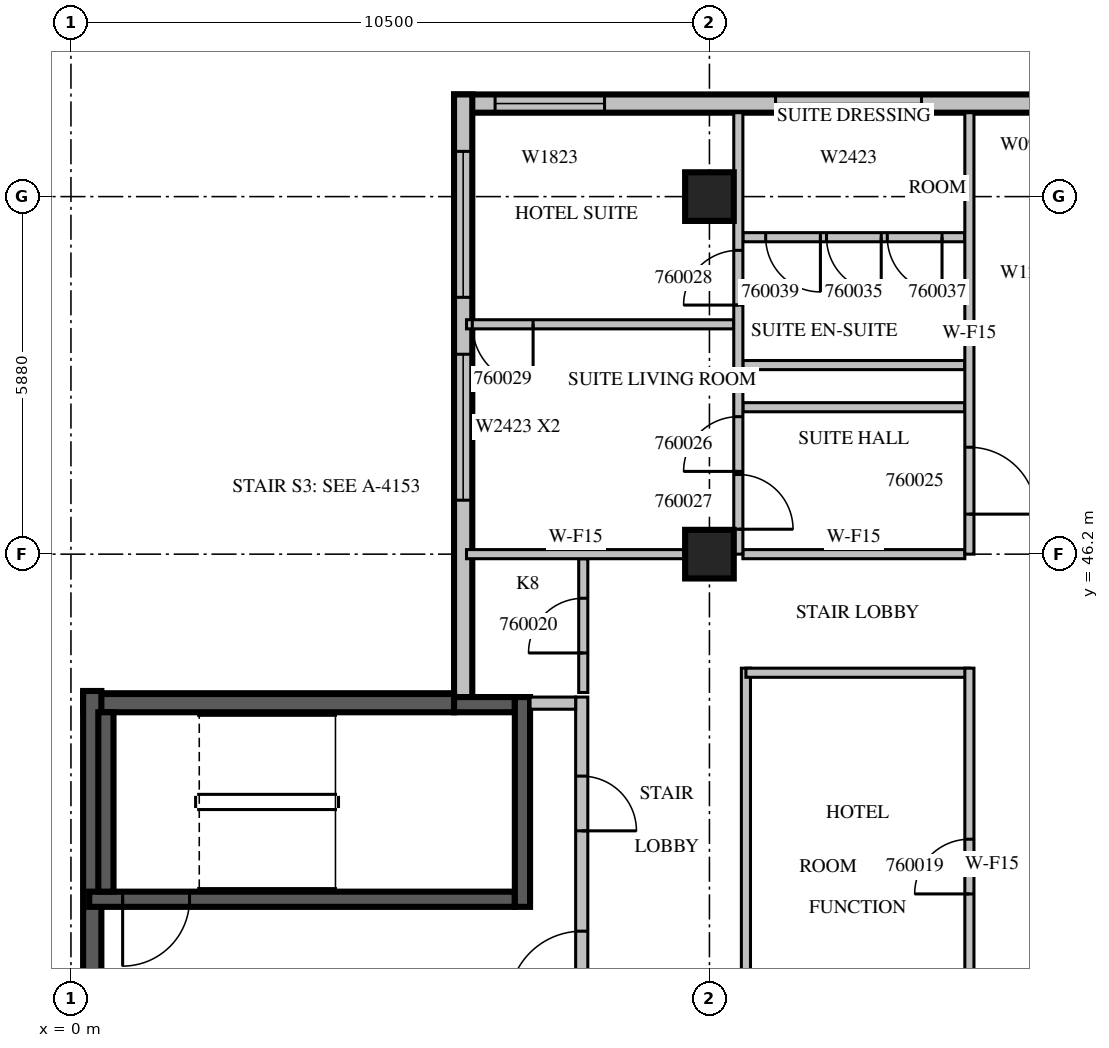
"""IFC4 building model, lengths in metres.
Left out: names, types, materials, properties, quantities, classifications, styles, units other than length and angle.
Written with IfcOpenShell. Run it as: python <this file> out.ifc"""

import sys

from ifc_helpers import new_model, si_unit, direction, frame, frame_2d, origin, origin_2d, place, context, subcontext, project, spatial, rectangle, extrude, source, transform, mapped, element, fill, save


model = new_model("IFC4")
c1 = context("Model", 3, precision=1e-05, world=origin(), true_north=direction((0.0, 1.0)))
c2 = subcontext(c1, "Body", "Model", "MODEL_VIEW")
j1 = project(units=[si_unit("LENGTHUNIT", "METRE"), si_unit("PLANEANGLEUNIT", "RADIAN")], contexts=[c1])
p1 = place(None, origin())
s1 = spatial("IfcSite", under=j1, at=p1, CompositionType="ELEMENT")
p2 = place(p1, origin())
s2 = spatial("IfcBuilding", under=s1, at=p2, CompositionType="ELEMENT")
p3 = place(p2, frame((0.0, 0.0, 261.4)))
s3 = spatial("IfcBuildingStorey", under=s2, at=p3, CompositionType="ELEMENT", Elevation=261.4)
m1 = source(origin(), c2, "Body", "SweptSolid", [
    extrude(rectangle(XDim=0.8, YDim=0.8, at=origin_2d()), origin(), (0.0, 0.0, 1.0), 3.8),
])
for number, where, z_axis, x_axis in (
    (1, (10.5, 46.2, 0.0), (0.0, 0.0, 1.0), (1.0, 0.0, 0.0)),
    (2, (10.5, 52.08, 0.0), (0.0, 0.0, 1.0), (1.0, 0.0, 0.0)),
):
    element("IfcColumn", number, at=place(p3, frame(where, z_axis=z_axis, x_axis=x_axis)), inside=s3, PredefinedType="COLUMN", context=c2, shape_type="MappedRepresentation", body=[
        mapped(m1, transform((0.0, 0.0, 0.0), scale=1.0)),
    ])
m2 = source(origin(), c2, "Body", "SweptSolid", [
    extrude(rectangle(XDim=10.5, YDim=0.3, at=frame_2d((5.25, 0.0))), origin(), (0.0, 0.0, 1.0), 3.4),
])
p4 = place(p3, frame((16.8, 53.61, 0.0), z_axis=(0.0, 0.0, 1.0), x_axis=(-1.0, 0.0, 0.0)))
e3 = element("IfcWall", 3, at=p4, inside=s3, PredefinedType="STANDARD", context=c2, shape_type="MappedRepresentation", body=[
    mapped(m2, transform((0.0, 0.0, 0.0), scale=1.0)),
])
m3 = source(origin(), c2, "Body", "SweptSolid", [
    extrude(rectangle(XDim=1.8, YDim=2.3, at=frame_2d((0.9, 1.15))), frame((0.0, 0.16, 0.0), z_axis=(0.0, -1.0, 0.0), x_axis=(1.0, 0.0, 0.0)), (0.0, 0.0, 1.0), 0.32),
])
p5 = place(p4, frame((8.025, 0.0, 0.6)))
e4 = element("IfcOpeningElement", 4, at=p5, cuts=e3, PredefinedType="OPENING", context=c2, shape_type="MappedRepresentation", body=[
    mapped(m3, transform((0.0, 0.0, 0.0), scale=1.0)),
])
m4 = source(origin(), c2, "Body", "SweptSolid", [
    extrude(rectangle(XDim=2.4, YDim=2.3, at=frame_2d((1.2, 1.15))), frame((0.0, 0.16, 0.0), z_axis=(0.0, -1.0, 0.0), x_axis=(1.0, 0.0, 0.0)), (0.0, 0.0, 1.0), 0.32),
])
p6 = place(p4, frame((2.812, 0.0, 0.6)))
e5 = element("IfcOpeningElement", 5, at=p6, cuts=e3, PredefinedType="OPENING", context=c2, shape_type="MappedRepresentation", body=[
    mapped(m4, transform((0.0, 0.0, 0.0), scale=1.0)),
])
m5 = source(origin(), c2, "Body", "SweptSolid", [
    extrude(rectangle(XDim=9.91, YDim=0.3, at=frame_2d((4.955, 0.0))), origin(), (0.0, 0.0, 1.0), 3.4),
])
p7 = place(p3, frame((6.45, 53.76, 0.0), z_axis=(0.0, 0.0, 1.0), x_axis=(0.0, -1.0, 0.0)))
e6 = element("IfcWall", 6, at=p7, inside=s3, PredefinedType="STANDARD", context=c2, shape_type="MappedRepresentation", body=[
    mapped(m5, transform((0.0, 0.0, 0.0), scale=1.0)),
])
p8 = place(p7, frame((4.272, 0.0, 0.6)))
e7 = element("IfcOpeningElement", 7, at=p8, cuts=e6, PredefinedType="OPENING", context=c2, shape_type="MappedRepresentation", body=[
    mapped(m4, transform((0.0, 0.0, 0.0), scale=1.0)),
])
p9 = place(p7, frame((0.936, 0.0, 0.6)))
e8 = element("IfcOpeningElement", 8, at=p9, cuts=e6, PredefinedType="OPENING", context=c2, shape_type="MappedRepresentation", body=[
    mapped(m4, transform((0.0, 0.0, 0.0), scale=1.0)),
])
m6 = source(origin(), c2, "Body", "SweptSolid", [
    extrude(rectangle(XDim=6.1, YDim=0.3, at=frame_2d((3.05, 0.0))), origin(), (0.0, 0.0, 1.0), 3.4),
])
p10 = place(p3, frame((6.3, 43.75, 0.0), z_axis=(0.0, 0.0, 1.0), x_axis=(-1.0, 0.0, 0.0)))
e9 = element("IfcWall", 9, at=p10, inside=s3, PredefinedType="SOLIDWALL", context=c2, shape_type="MappedRepresentation", body=[
    mapped(m6, transform((0.0, 0.0, 0.0), scale=1.0)),
])
m7 = source(origin(), c2, "Body", "SweptSolid", [
    extrude(rectangle(XDim=5.65, YDim=0.3, at=frame_2d((2.825, 0.0))), origin(), (0.0, 0.0, 1.0), 3.4),
])
p11 = place(p3, frame((0.35, 43.95, 0.0), z_axis=(0.0, 0.0, 1.0), x_axis=(0.0, -1.0, 0.0)))
e10 = element("IfcWall", 10, at=p11, inside=s3, PredefinedType="SOLIDWALL", context=c2, shape_type="MappedRepresentation", body=[
    mapped(m7, transform((0.0, 0.0, 0.0), scale=1.0)),
])
m8 = source(origin(), c2, "Body", "SweptSolid", [
    extrude(rectangle(XDim=7.0, YDim=0.25, at=frame_2d((3.5, 0.0))), origin(), (0.0, 0.0, 1.0), 3.4),
])
p12 = place(p3, frame((0.3, 40.525, 0.0), z_axis=(0.0, 0.0, 1.0), x_axis=(1.0, 0.0, 0.0)))
e11 = element("IfcWall", 11, at=p12, inside=s3, PredefinedType="SOLIDWALL", context=c2, shape_type="MappedRepresentation", body=[
    mapped(m8, transform((0.0, 0.0, 0.0), scale=1.0)),
])
m9 = source(origin(), c2, "Body", "SweptSolid", [
    extrude(rectangle(XDim=1.1, YDim=2.1, at=frame_2d((0.55, 1.05))), frame((0.0, 0.135, 0.0), z_axis=(0.0, -1.0, 0.0), x_axis=(1.0, 0.0, 0.0)), (0.0, 0.0, 1.0), 0.27),
])
p13 = place(p12, frame((0.55, 0.0, 0.0)))
e12 = element("IfcOpeningElement", 12, at=p13, cuts=e11, PredefinedType="OPENING", context=c2, shape_type="MappedRepresentation", body=[
    mapped(m9, transform((0.0, 0.0, 0.0), scale=1.0)),
])
m10 = source(origin(), c2, "Body", "SweptSolid", [
    extrude(rectangle(XDim=1.0, YDim=0.25, at=frame_2d((0.5, 0.0))), origin(), (0.0, 0.0, 1.0), 3.4),
])
p14 = place(p3, frame((6.3, 43.725, 0.0), z_axis=(0.0, 0.0, 1.0), x_axis=(1.0, 0.0, 0.0)))
e13 = element("IfcWall", 13, at=p14, inside=s3, PredefinedType="SOLIDWALL", context=c2, shape_type="MappedRepresentation", body=[
    mapped(m10, transform((0.0, 0.0, 0.0), scale=1.0)),
])
m11 = source(origin(), c2, "Body", "SweptSolid", [
    extrude(rectangle(XDim=3.45, YDim=0.25, at=frame_2d((1.725, 0.0))), origin(), (0.0, 0.0, 1.0), 3.4),
])
p15 = place(p3, frame((7.425, 40.4, 0.0), z_axis=(0.0, 0.0, 1.0), x_axis=(0.0, 1.0, 0.0)))
e14 = element("IfcWall", 14, at=p15, inside=s3, PredefinedType="SOLIDWALL", context=c2, shape_type="MappedRepresentation", body=[
    mapped(m11, transform((0.0, 0.0, 0.0), scale=1.0)),
])
m12 = source(origin(), c2, "Body", "SweptSolid", [
    extrude(rectangle(XDim=2.95, YDim=0.25, at=frame_2d((1.475, 0.0))), origin(), (0.0, 0.0, 1.0), 3.4),
])
p16 = place(p3, frame((0.575, 40.65, 0.0), z_axis=(0.0, 0.0, 1.0), x_axis=(0.0, 1.0, 0.0)))
e15 = element("IfcWall", 15, at=p16, inside=s3, PredefinedType="SOLIDWALL", context=c2, shape_type="MappedRepresentation", body=[
    mapped(m12, transform((0.0, 0.0, 0.0), scale=1.0)),
])
m13 = source(origin(), c2, "Body", "SweptSolid", [
    extrude(rectangle(XDim=5.45, YDim=0.2, at=frame_2d((2.725, 0.0))), origin(), (0.0, 0.0, 1.0), 3.4),
])
p17 = place(p3, frame((8.4, 38.4, 0.0), z_axis=(0.0, 0.0, 1.0), x_axis=(0.0, 1.0, 0.0)))
e16 = element("IfcWall", 16, at=p17, inside=s3, PredefinedType="PARTITIONING", context=c2, shape_type="MappedRepresentation", body=[
    mapped(m13, transform((0.0, 0.0, 0.0), scale=1.0)),
])
m14 = source(origin(), c2, "Body", "SweptSolid", [
    extrude(rectangle(XDim=1.2, YDim=2.1, at=frame_2d((0.6, 1.05))), frame((0.0, 0.11, 0.0), z_axis=(0.0, -1.0, 0.0), x_axis=(1.0, 0.0, 0.0)), (0.0, 0.0, 1.0), 0.22),
])
p18 = place(p17, frame((0.4, 0.0, 0.0)))
e17 = element("IfcOpeningElement", 17, at=p18, cuts=e16, PredefinedType="OPENING", context=c2, shape_type="MappedRepresentation", body=[
    mapped(m14, transform((0.0, 0.0, 0.0), scale=1.0)),
])
m15 = source(origin(), c2, "Body", "SweptSolid", [
    extrude(rectangle(XDim=0.9, YDim=2.1, at=frame_2d((0.45, 1.05))), frame((0.0, 0.11, 0.0), z_axis=(0.0, -1.0, 0.0), x_axis=(1.0, 0.0, 0.0)), (0.0, 0.0, 1.0), 0.22),
])
p19 = place(p17, frame((3.25, 0.0, 0.0)))
e18 = element("IfcOpeningElement", 18, at=p19, cuts=e16, PredefinedType="OPENING", context=c2, shape_type="MappedRepresentation", body=[
    mapped(m15, transform((0.0, 0.0, 0.0), scale=1.0)),
])
m16 = source(origin(), c2, "Body", "SweptSolid", [
    extrude(rectangle(XDim=0.75, YDim=0.2, at=frame_2d((0.375, 0.0))), origin(), (0.0, 0.0, 1.0), 3.4),
])
p20 = place(p3, frame((7.55, 43.75, 0.0), z_axis=(0.0, 0.0, 1.0), x_axis=(1.0, 0.0, 0.0)))
e19 = element("IfcWall", 19, at=p20, inside=s3, PredefinedType="PARTITIONING", context=c2, shape_type="MappedRepresentation", body=[
    mapped(m16, transform((0.0, 0.0, 0.0), scale=1.0)),
])
m17 = source(origin(), c2, "Body", "SweptSolid", [
    extrude(rectangle(XDim=6.45, YDim=0.15, at=frame_2d((3.225, 0.0))), origin(), (0.0, 0.0, 1.0), 3.4),
])
p21 = place(p3, frame((11.1, 44.325, 0.0), z_axis=(0.0, 0.0, 1.0), x_axis=(0.0, -1.0, 0.0)))
e20 = element("IfcWall", 20, at=p21, inside=s3, PredefinedType="PARTITIONING", context=c2, shape_type="MappedRepresentation", body=[
    mapped(m17, transform((0.0, 0.0, 0.0), scale=1.0)),
])
m18 = source(origin(), c2, "Body", "SweptSolid", [
    extrude(rectangle(XDim=3.675, YDim=0.15, at=frame_2d((1.837, 0.0))), origin(), (0.0, 0.0, 1.0), 3.4),
])
p22 = place(p3, frame((14.775, 44.25, 0.0), z_axis=(0.0, 0.0, 1.0), x_axis=(-1.0, 0.0, 0.0)))
e21 = element("IfcWall", 21, at=p22, inside=s3, PredefinedType="PARTITIONING", context=c2, shape_type="MappedRepresentation", body=[
    mapped(m18, transform((0.0, 0.0, 0.0), scale=1.0)),
])
p23 = place(p3, frame((14.775, 37.875, 0.0), z_axis=(0.0, 0.0, 1.0), x_axis=(0.0, 1.0, 0.0)))
e22 = element("IfcWall", 22, at=p23, inside=s3, PredefinedType="PARTITIONING", context=c2, shape_type="MappedRepresentation", body=[
    mapped(m17, transform((0.0, 0.0, 0.0), scale=1.0)),
])
m19 = source(origin(), c2, "Body", "SweptSolid", [
    extrude(rectangle(XDim=0.9, YDim=2.1, at=frame_2d((0.45, 1.05))), frame((0.0, 0.085, 0.0), z_axis=(0.0, -1.0, 0.0), x_axis=(1.0, 0.0, 0.0)), (0.0, 0.0, 1.0), 0.17),
])
p24 = place(p23, frame((2.737, 0.0, 0.0)))
e23 = element("IfcOpeningElement", 23, at=p24, cuts=e22, PredefinedType="OPENING", context=c2, shape_type="MappedRepresentation", body=[
    mapped(m19, transform((0.0, 0.0, 0.0), scale=1.0)),
])
m20 = source(origin(), c2, "Body", "SweptSolid", [
    extrude(rectangle(XDim=2.2, YDim=0.15, at=frame_2d((1.1, 0.0))), origin(), (0.0, 0.0, 1.0), 3.4),
])
p25 = place(p3, frame((8.425, 43.925, 0.0), z_axis=(0.0, 0.0, 1.0), x_axis=(0.0, 1.0, 0.0)))
e24 = element("IfcWall", 24, at=p25, inside=s3, PredefinedType="PARTITIONING", context=c2, shape_type="MappedRepresentation", body=[
    mapped(m20, transform((0.0, 0.0, 0.0), scale=1.0)),
])
p26 = place(p25, frame((0.65, 0.0, 0.0)))
e25 = element("IfcOpeningElement", 25, at=p26, cuts=e24, PredefinedType="OPENING", context=c2, shape_type="MappedRepresentation", body=[
    mapped(m19, transform((0.0, 0.0, 0.0), scale=1.0)),
])
p27 = place(p3, frame((10.9, 49.98, 0.0), z_axis=(0.0, 0.0, 1.0), x_axis=(-1.0, 0.0, 0.0)))
e26 = element("IfcWall", 26, at=p27, inside=s3, PredefinedType="PARTITIONING", context=c2, shape_type="SweptSolid", body=[
    extrude(rectangle(XDim=4.395, YDim=0.15, at=frame_2d((2.197, 0.0))), origin(), (0.0, 0.0, 1.0), 3.4),
])
m21 = source(origin(), c2, "Body", "SweptSolid", [
    extrude(rectangle(XDim=1.0, YDim=2.1, at=frame_2d((0.5, 1.05))), frame((0.0, 0.085, 0.0), z_axis=(0.0, -1.0, 0.0), x_axis=(1.0, 0.0, 0.0)), (0.0, 0.0, 1.0), 0.17),
])
p28 = place(p27, frame((3.3, 0.0, 0.0)))
e27 = element("IfcOpeningElement", 27, at=p28, cuts=e26, PredefinedType="OPENING", context=c2, shape_type="MappedRepresentation", body=[
    mapped(m21, transform((0.0, 0.0, 0.0), scale=1.0)),
])
m22 = source(origin(), c2, "Body", "SweptSolid", [
    extrude(rectangle(XDim=3.65, YDim=0.15, at=frame_2d((1.825, 0.0))), origin(), (0.0, 0.0, 1.0), 3.4),
])
for number, where, z_axis, x_axis in (
    (28, (14.7, 48.617, 0.0), (0.0, 0.0, 1.0), (-1.0, 0.0, 0.0)),
    (29, (14.7, 49.309, 0.0), (0.0, 0.0, 1.0), (-1.0, 0.0, 0.0)),
):
    element("IfcWall", number, at=place(p3, frame(where, z_axis=z_axis, x_axis=x_axis)), inside=s3, PredefinedType="PARTITIONING", context=c2, shape_type="MappedRepresentation", body=[
        mapped(m22, transform((0.0, 0.0, 0.0), scale=1.0)),
    ])
p29 = place(p3, frame((14.7, 51.412, 0.0), z_axis=(0.0, 0.0, 1.0), x_axis=(-1.0, 0.0, 0.0)))
e30 = element("IfcWall", 30, at=p29, inside=s3, PredefinedType="PARTITIONING", context=c2, shape_type="MappedRepresentation", body=[
    mapped(m22, transform((0.0, 0.0, 0.0), scale=1.0)),
])
p30 = place(p29, frame((1.375, 0.0, 0.0)))
e31 = element("IfcOpeningElement", 31, at=p30, cuts=e30, PredefinedType="OPENING", context=c2, shape_type="MappedRepresentation", body=[
    mapped(m19, transform((0.0, 0.0, 0.0), scale=1.0)),
])
p31 = place(p29, frame((0.375, 0.0, 0.0)))
e32 = element("IfcOpeningElement", 32, at=p31, cuts=e30, PredefinedType="OPENING", context=c2, shape_type="MappedRepresentation", body=[
    mapped(m19, transform((0.0, 0.0, 0.0), scale=1.0)),
])
p32 = place(p29, frame((2.375, 0.0, 0.0)))
e33 = element("IfcOpeningElement", 33, at=p32, cuts=e30, PredefinedType="OPENING", context=c2, shape_type="MappedRepresentation", body=[
    mapped(m19, transform((0.0, 0.0, 0.0), scale=1.0)),
])
m23 = source(origin(), c2, "Body", "SweptSolid", [
    extrude(rectangle(XDim=3.596, YDim=0.15, at=frame_2d((1.798, 0.0))), origin(), (0.0, 0.0, 1.0), 3.4),
])
p33 = place(p3, frame((10.101, 46.2, 0.0), z_axis=(0.0, 0.0, 1.0), x_axis=(-1.0, 0.0, 0.0)))
e34 = element("IfcWall", 34, at=p33, inside=s3, PredefinedType="PARTITIONING", context=c2, shape_type="MappedRepresentation", body=[
    mapped(m23, transform((0.0, 0.0, 0.0), scale=1.0)),
])
p34 = place(p3, frame((14.7, 46.2, 0.0), z_axis=(0.0, 0.0, 1.0), x_axis=(-1.0, 0.0, 0.0)))
e35 = element("IfcWall", 35, at=p34, inside=s3, PredefinedType="PARTITIONING", context=c2, shape_type="MappedRepresentation", body=[
    mapped(m22, transform((0.0, 0.0, 0.0), scale=1.0)),
])
m24 = source(origin(), c2, "Body", "SweptSolid", [
    extrude(rectangle(XDim=7.26, YDim=0.15, at=frame_2d((3.63, 0.0))), origin(), (0.0, 0.0, 1.0), 3.4),
])
p35 = place(p3, frame((10.975, 46.2, 0.0), z_axis=(0.0, 0.0, 1.0), x_axis=(0.0, 1.0, 0.0)))
e36 = element("IfcWall", 36, at=p35, inside=s3, PredefinedType="PARTITIONING", context=c2, shape_type="MappedRepresentation", body=[
    mapped(m24, transform((0.0, 0.0, 0.0), scale=1.0)),
])
p36 = place(p35, frame((1.361, 0.0, 0.0)))
e37 = element("IfcOpeningElement", 37, at=p36, cuts=e36, PredefinedType="OPENING", context=c2, shape_type="MappedRepresentation", body=[
    mapped(m19, transform((0.0, 0.0, 0.0), scale=1.0)),
])
p37 = place(p35, frame((0.41, 0.0, 0.0)))
e38 = element("IfcOpeningElement", 38, at=p37, cuts=e36, PredefinedType="OPENING", context=c2, shape_type="MappedRepresentation", body=[
    mapped(m19, transform((0.0, 0.0, 0.0), scale=1.0)),
])
p38 = place(p35, frame((4.096, 0.0, 0.0)))
e39 = element("IfcOpeningElement", 39, at=p38, cuts=e36, PredefinedType="OPENING", context=c2, shape_type="MappedRepresentation", body=[
    mapped(m19, transform((0.0, 0.0, 0.0), scale=1.0)),
])
p39 = place(p3, frame((14.775, 46.2, 0.0), z_axis=(0.0, 0.0, 1.0), x_axis=(0.0, 1.0, 0.0)))
e40 = element("IfcWall", 40, at=p39, inside=s3, PredefinedType="PARTITIONING", context=c2, shape_type="MappedRepresentation", body=[
    mapped(m24, transform((0.0, 0.0, 0.0), scale=1.0)),
])
m25 = source(origin(), c2, "Body", "SweptSolid", [
    extrude(rectangle(XDim=1.1, YDim=2.1, at=frame_2d((0.55, 1.05))), frame((0.0, 0.085, 0.0), z_axis=(0.0, -1.0, 0.0), x_axis=(1.0, 0.0, 0.0)), (0.0, 0.0, 1.0), 0.17),
])
p40 = place(p39, frame((0.658, 0.0, 0.0)))
e41 = element("IfcOpeningElement", 41, at=p40, cuts=e40, PredefinedType="OPENING", context=c2, shape_type="MappedRepresentation", body=[
    mapped(m25, transform((0.0, 0.0, 0.0), scale=1.0)),
])
m26 = source(origin(), c2, "Body", "SweptSolid", [
    extrude(rectangle(XDim=1.8, YDim=2.3, at=frame_2d((0.9, 1.15))), frame((0.0, 0.03, 0.0), z_axis=(0.0, -1.0, 0.0), x_axis=(1.0, 0.0, 0.0)), (0.0, 0.0, 1.0), 0.06),
])
p41 = place(p5, origin())
e42 = element("IfcWindow", 42, at=p41, inside=s3, PartitioningType="SINGLE_PANEL", PredefinedType="WINDOW", context=c2, shape_type="MappedRepresentation", body=[
    mapped(m26, transform((0.0, 0.0, 0.0), scale=1.0)),
])
fill(e4, e42)
m27 = source(origin(), c2, "Body", "SweptSolid", [
    extrude(rectangle(XDim=2.4, YDim=2.3, at=frame_2d((1.2, 1.15))), frame((0.0, 0.03, 0.0), z_axis=(0.0, -1.0, 0.0), x_axis=(1.0, 0.0, 0.0)), (0.0, 0.0, 1.0), 0.06),
])
p42 = place(p6, origin())
e43 = element("IfcWindow", 43, at=p42, inside=s3, PartitioningType="SINGLE_PANEL", PredefinedType="WINDOW", context=c2, shape_type="MappedRepresentation", body=[
    mapped(m27, transform((0.0, 0.0, 0.0), scale=1.0)),
])
fill(e5, e43)
p43 = place(p8, origin())
e44 = element("IfcWindow", 44, at=p43, inside=s3, PartitioningType="SINGLE_PANEL", PredefinedType="WINDOW", context=c2, shape_type="MappedRepresentation", body=[
    mapped(m27, transform((0.0, 0.0, 0.0), scale=1.0)),
])
fill(e7, e44)
p44 = place(p9, origin())
e45 = element("IfcWindow", 45, at=p44, inside=s3, PartitioningType="SINGLE_PANEL", PredefinedType="WINDOW", context=c2, shape_type="MappedRepresentation", body=[
    mapped(m27, transform((0.0, 0.0, 0.0), scale=1.0)),
])
fill(e8, e45)
m28 = source(origin(), c2, "Body", "SweptSolid", [
    extrude(rectangle(XDim=1.1, YDim=2.1, at=frame_2d((0.55, 1.05))), frame((0.0, 0.025, 0.0), z_axis=(0.0, -1.0, 0.0), x_axis=(1.0, 0.0, 0.0)), (0.0, 0.0, 1.0), 0.05),
])
p45 = place(p13, origin())
e46 = element("IfcDoor", 46, at=p45, inside=s3, OperationType="SINGLE_SWING_RIGHT", PredefinedType="DOOR", context=c2, shape_type="MappedRepresentation", body=[
    mapped(m28, transform((0.0, 0.0, 0.0), scale=1.0)),
])
fill(e12, e46)
m29 = source(origin(), c2, "Body", "SweptSolid", [
    extrude(rectangle(XDim=1.2, YDim=2.1, at=frame_2d((0.6, 1.05))), frame((0.0, 0.025, 0.0), z_axis=(0.0, -1.0, 0.0), x_axis=(1.0, 0.0, 0.0)), (0.0, 0.0, 1.0), 0.05),
])
p46 = place(p18, origin())
e47 = element("IfcDoor", 47, at=p46, inside=s3, OperationType="SINGLE_SWING_LEFT", PredefinedType="DOOR", context=c2, shape_type="MappedRepresentation", body=[
    mapped(m29, transform((0.0, 0.0, 0.0), scale=1.0)),
])
fill(e17, e47)
m30 = source(origin(), c2, "Body", "SweptSolid", [
    extrude(rectangle(XDim=0.9, YDim=2.1, at=frame_2d((0.45, 1.05))), frame((0.0, 0.025, 0.0), z_axis=(0.0, -1.0, 0.0), x_axis=(1.0, 0.0, 0.0)), (0.0, 0.0, 1.0), 0.05),
])
p47 = place(p19, origin())
e48 = element("IfcDoor", 48, at=p47, inside=s3, OperationType="SINGLE_SWING_RIGHT", PredefinedType="DOOR", context=c2, shape_type="MappedRepresentation", body=[
    mapped(m30, transform((0.0, 0.0, 0.0), scale=1.0)),
])
fill(e18, e48)
p48 = place(p24, origin())
e49 = element("IfcDoor", 49, at=p48, inside=s3, OperationType="SINGLE_SWING_LEFT", PredefinedType="DOOR", context=c2, shape_type="MappedRepresentation", body=[
    mapped(m30, transform((0.0, 0.0, 0.0), scale=1.0)),
])
fill(e23, e49)
p49 = place(p26, origin())
e50 = element("IfcDoor", 50, at=p49, inside=s3, OperationType="SINGLE_SWING_LEFT", PredefinedType="DOOR", context=c2, shape_type="MappedRepresentation", body=[
    mapped(m30, transform((0.0, 0.0, 0.0), scale=1.0)),
])
fill(e25, e50)
p50 = place(p40, origin())
e51 = element("IfcDoor", 51, at=p50, inside=s3, OperationType="SINGLE_SWING_RIGHT", PredefinedType="DOOR", context=c2, shape_type="MappedRepresentation", body=[
    mapped(m28, transform((0.0, 0.0, 0.0), scale=1.0)),
])
fill(e41, e51)
p51 = place(p36, origin())
e52 = element("IfcDoor", 52, at=p51, inside=s3, OperationType="SINGLE_SWING_LEFT", PredefinedType="DOOR", context=c2, shape_type="MappedRepresentation", body=[
    mapped(m30, transform((0.0, 0.0, 0.0), scale=1.0)),
])
fill(e37, e52)
p52 = place(p37, origin())
e53 = element("IfcDoor", 53, at=p52, inside=s3, OperationType="SINGLE_SWING_RIGHT", PredefinedType="DOOR", context=c2, shape_type="MappedRepresentation", body=[
    mapped(m30, transform((0.0, 0.0, 0.0), scale=1.0)),
])
fill(e38, e53)
p53 = place(p38, origin())
e54 = element("IfcDoor", 54, at=p53, inside=s3, OperationType="SINGLE_SWING_LEFT", PredefinedType="DOOR", context=c2, shape_type="MappedRepresentation", body=[
    mapped(m30, transform((0.0, 0.0, 0.0), scale=1.0)),
])
fill(e39, e54)
m31 = source(origin(), c2, "Body", "SweptSolid", [
    extrude(rectangle(XDim=1.0, YDim=2.1, at=frame_2d((0.5, 1.05))), frame((0.0, 0.025, 0.0), z_axis=(0.0, -1.0, 0.0), x_axis=(1.0, 0.0, 0.0)), (0.0, 0.0, 1.0), 0.05),
])
p54 = place(p28, origin())
e55 = element("IfcDoor", 55, at=p54, inside=s3, OperationType="SINGLE_SWING_LEFT", PredefinedType="DOOR", context=c2, shape_type="MappedRepresentation", body=[
    mapped(m31, transform((0.0, 0.0, 0.0), scale=1.0)),
])
fill(e27, e55)
p55 = place(p30, origin())
e56 = element("IfcDoor", 56, at=p55, inside=s3, OperationType="SINGLE_SWING_LEFT", PredefinedType="DOOR", context=c2, shape_type="MappedRepresentation", body=[
    mapped(m30, transform((0.0, 0.0, 0.0), scale=1.0)),
])
fill(e31, e56)
p56 = place(p31, origin())
e57 = element("IfcDoor", 57, at=p56, inside=s3, OperationType="SINGLE_SWING_LEFT", PredefinedType="DOOR", context=c2, shape_type="MappedRepresentation", body=[
    mapped(m30, transform((0.0, 0.0, 0.0), scale=1.0)),
])
fill(e32, e57)
p57 = place(p32, origin())
e58 = element("IfcDoor", 58, at=p57, inside=s3, OperationType="SINGLE_SWING_LEFT", PredefinedType="DOOR", context=c2, shape_type="MappedRepresentation", body=[
    mapped(m30, transform((0.0, 0.0, 0.0), scale=1.0)),
])
fill(e33, e58)
save(model, sys.argv[1])
